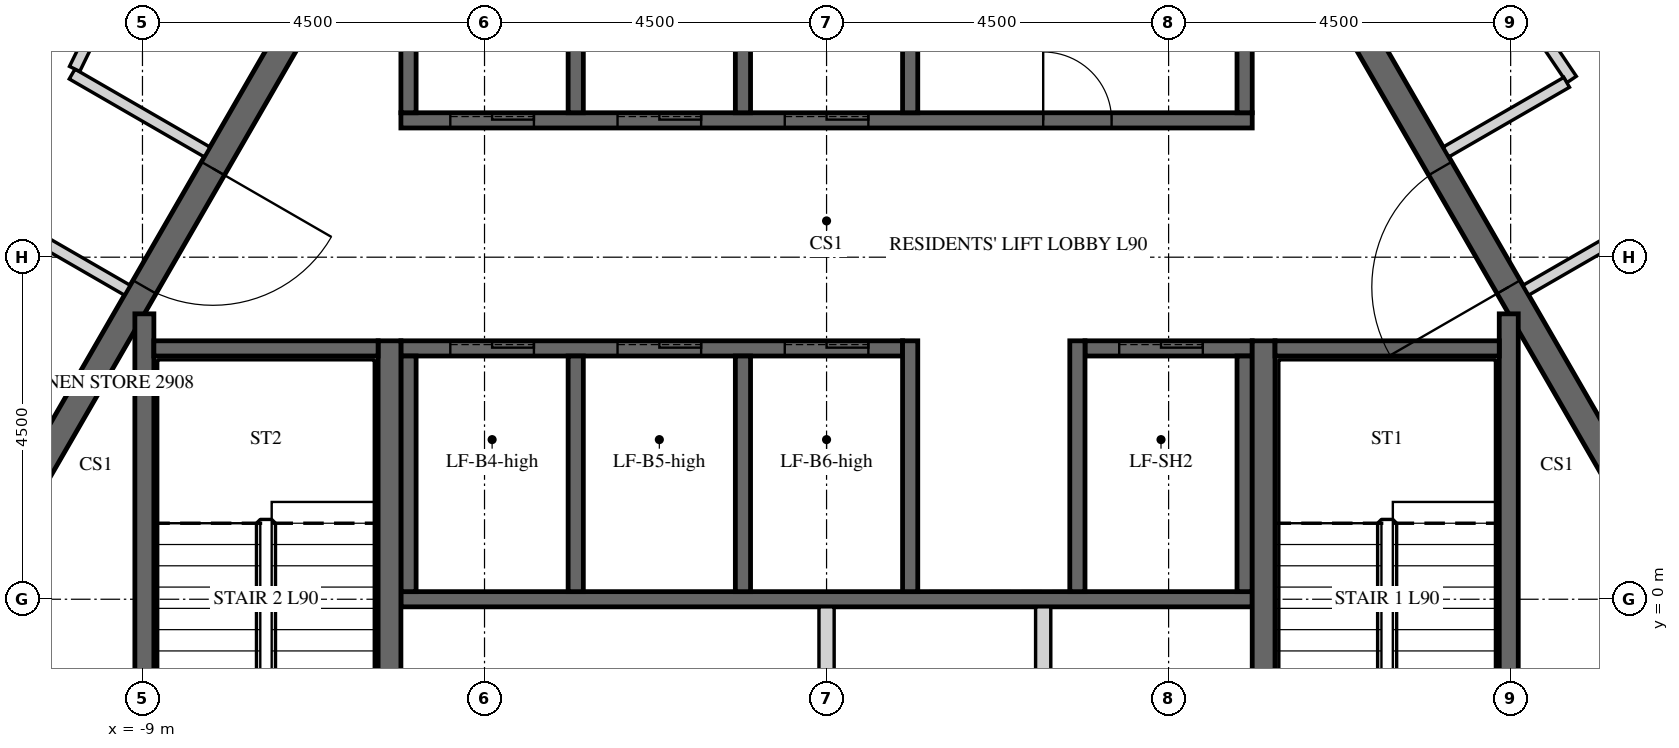
"""IFC4 building model, lengths in metres.
Left out: names, types, materials, properties, quantities, classifications, styles, units other than length and angle.
Written with IfcOpenShell. Run it as: python <this file> out.ifc"""

import sys

from ifc_helpers import new_model, si_unit, direction, frame, frame_2d, origin, place, context, subcontext, project, spatial, polyline, rectangle, outline, extrude, element, fill, save


model = new_model("IFC4")
c1 = context("Model", 3, precision=1e-05, world=origin(), true_north=direction((0.0, 1.0)))
c2 = subcontext(c1, "Body", "Model", "MODEL_VIEW")
j1 = project(units=[si_unit("LENGTHUNIT", "METRE"), si_unit("PLANEANGLEUNIT", "RADIAN")], contexts=[c1])
p1 = place(None, origin())
s1 = spatial("IfcSite", under=j1, at=p1, CompositionType="ELEMENT")
p2 = place(p1, origin())
s2 = spatial("IfcBuilding", under=s1, at=p2, CompositionType="ELEMENT")
p3 = place(p2, frame((0.0, 0.0, 372.9)))
s3 = spatial("IfcBuildingStorey", under=s2, at=p3, CompositionType="ELEMENT", Elevation=372.9)
p4 = place(p3, frame((-5.673, 9.825, -0.15), z_axis=(0.0, 0.0, 1.0), x_axis=(-0.499995046907, -0.866028263435, 0.0)))
e1 = element("IfcWall", 1, at=p4, inside=s3, PredefinedType="SHEAR", context=c2, shape_type="SweptSolid", body=[
    extrude(outline(polyline([(-0.101, -0.175), (11.446, -0.175), (11.244, 0.175), (0.101, 0.175), (-0.101, -0.175)])), origin(), (0.0, 0.0, 1.0), 3.55),
])
p5 = place(p4, frame((4.801, 0.0, 0.15)))
e2 = element("IfcOpeningElement", 2, at=p5, cuts=e1, PredefinedType="OPENING", context=c2, shape_type="SweptSolid", body=[
    extrude(rectangle(XDim=1.8, YDim=2.4, at=frame_2d((0.9, 1.2))), frame((0.0, 0.185, 0.0), z_axis=(0.0, -1.0, 0.0), x_axis=(1.0, 0.0, 0.0)), (0.0, 0.0, 1.0), 0.37),
])
p6 = place(p3, frame((-11.345, 0.0, -0.15), z_axis=(0.0, 0.0, 1.0), x_axis=(0.499995046907, -0.866028263435, 0.0)))
e3 = element("IfcWall", 3, at=p6, inside=s3, PredefinedType="SHEAR", context=c2, shape_type="SweptSolid", body=[
    extrude(outline(polyline([(-0.101, -0.175), (11.446, -0.175), (11.244, 0.175), (0.101, 0.175), (-0.101, -0.175)])), origin(), (0.0, 0.0, 1.0), 3.55),
])
p7 = place(p6, frame((4.744, 0.0, 0.15)))
e4 = element("IfcOpeningElement", 4, at=p7, cuts=e3, PredefinedType="OPENING", context=c2, shape_type="SweptSolid", body=[
    extrude(rectangle(XDim=1.8, YDim=2.4, at=frame_2d((0.9, 1.2))), frame((0.0, 0.185, 0.0), z_axis=(0.0, -1.0, 0.0), x_axis=(1.0, 0.0, 0.0)), (0.0, 0.0, 1.0), 0.37),
])
p8 = place(p3, frame((5.673, -9.825, -0.15), z_axis=(0.0, 0.0, 1.0), x_axis=(0.499995046907, 0.866028263435, 0.0)))
e5 = element("IfcWall", 5, at=p8, inside=s3, PredefinedType="SHEAR", context=c2, shape_type="SweptSolid", body=[
    extrude(outline(polyline([(-0.101, -0.175), (11.446, -0.175), (11.244, 0.175), (0.101, 0.175), (-0.101, -0.175)])), origin(), (0.0, 0.0, 1.0), 3.55),
])
p9 = place(p8, frame((4.801, 0.0, 0.15)))
e6 = element("IfcOpeningElement", 6, at=p9, cuts=e5, PredefinedType="OPENING", context=c2, shape_type="SweptSolid", body=[
    extrude(rectangle(XDim=1.8, YDim=2.4, at=frame_2d((0.9, 1.2))), frame((0.0, 0.185, 0.0), z_axis=(0.0, -1.0, 0.0), x_axis=(1.0, 0.0, 0.0)), (0.0, 0.0, 1.0), 0.37),
])
p10 = place(p3, frame((11.345, 0.0, -0.15), z_axis=(0.0, 0.0, 1.0), x_axis=(-0.499995046907, 0.866028263435, 0.0)))
e7 = element("IfcWall", 7, at=p10, inside=s3, PredefinedType="SHEAR", context=c2, shape_type="SweptSolid", body=[
    extrude(outline(polyline([(-0.101, -0.175), (11.446, -0.175), (11.244, 0.175), (0.101, 0.175), (-0.101, -0.175)])), origin(), (0.0, 0.0, 1.0), 3.55),
])
p11 = place(p10, frame((4.744, 0.0, 0.15)))
e8 = element("IfcOpeningElement", 8, at=p11, cuts=e7, PredefinedType="OPENING", context=c2, shape_type="SweptSolid", body=[
    extrude(rectangle(XDim=1.8, YDim=2.4, at=frame_2d((0.9, 1.2))), frame((0.0, 0.185, 0.0), z_axis=(0.0, -1.0, 0.0), x_axis=(1.0, 0.0, 0.0)), (0.0, 0.0, 1.0), 0.37),
])
p12 = place(p3, frame((-5.6, 6.3, -0.25), z_axis=(0.0, 0.0, 1.0), x_axis=(1.0, 0.0, 0.0)))
e9 = element("IfcWall", 9, at=p12, inside=s3, PredefinedType="SHEAR", context=c2, shape_type="SweptSolid", body=[
    extrude(rectangle(XDim=11.2, YDim=0.2, at=frame_2d((5.6, 0.0))), origin(), (0.0, 0.0, 1.0), 3.9),
])
p13 = place(p12, frame((8.45, 0.0, 0.25)))
e10 = element("IfcOpeningElement", 10, at=p13, cuts=e9, PredefinedType="OPENING", context=c2, shape_type="SweptSolid", body=[
    extrude(rectangle(XDim=0.9, YDim=2.1, at=frame_2d((0.45, 1.05))), frame((0.0, 0.11, 0.0), z_axis=(0.0, -1.0, 0.0), x_axis=(1.0, 0.0, 0.0)), (0.0, 0.0, 1.0), 0.22),
])
p14 = place(p12, frame((0.65, 0.0, 0.25)))
e11 = element("IfcOpeningElement", 11, at=p14, cuts=e9, PredefinedType="OPENING", context=c2, shape_type="SweptSolid", body=[
    extrude(rectangle(XDim=1.1, YDim=2.1, at=frame_2d((0.55, 1.05))), frame((0.0, 0.11, 0.0), z_axis=(0.0, -1.0, 0.0), x_axis=(1.0, 0.0, 0.0)), (0.0, 0.0, 1.0), 0.22),
])
p15 = place(p12, frame((2.85, 0.0, 0.25)))
e12 = element("IfcOpeningElement", 12, at=p15, cuts=e9, PredefinedType="OPENING", context=c2, shape_type="SweptSolid", body=[
    extrude(rectangle(XDim=1.1, YDim=2.1, at=frame_2d((0.55, 1.05))), frame((0.0, 0.11, 0.0), z_axis=(0.0, -1.0, 0.0), x_axis=(1.0, 0.0, 0.0)), (0.0, 0.0, 1.0), 0.22),
])
p16 = place(p12, frame((5.05, 0.0, 0.25)))
e13 = element("IfcOpeningElement", 13, at=p16, cuts=e9, PredefinedType="OPENING", context=c2, shape_type="SweptSolid", body=[
    extrude(rectangle(XDim=1.1, YDim=2.1, at=frame_2d((0.55, 1.05))), frame((0.0, 0.11, 0.0), z_axis=(0.0, -1.0, 0.0), x_axis=(1.0, 0.0, 0.0)), (0.0, 0.0, 1.0), 0.22),
])
for number, where, z_axis, x_axis in (
    (14, (-5.5, 6.4, -0.25), (0.0, 0.0, 1.0), (0.0, 1.0, 0.0)),
    (15, (-3.3, 6.4, -0.25), (0.0, 0.0, 1.0), (0.0, 1.0, 0.0)),
    (16, (-1.1, 6.4, -0.25), (0.0, 0.0, 1.0), (0.0, 1.0, 0.0)),
    (17, (1.1, 6.4, -0.25), (0.0, 0.0, 1.0), (0.0, 1.0, 0.0)),
    (18, (5.5, 6.4, -0.25), (0.0, 0.0, 1.0), (0.0, 1.0, 0.0)),
):
    element("IfcWall", number, at=place(p3, frame(where, z_axis=z_axis, x_axis=x_axis)), inside=s3, PredefinedType="SHEAR", context=c2, shape_type="SweptSolid", body=[
        extrude(rectangle(XDim=2.9, YDim=0.2, at=frame_2d((1.45, 0.0))), origin(), (0.0, 0.0, 1.0), 3.9),
    ])
p17 = place(p3, frame((-5.6, 3.3, -0.25), z_axis=(0.0, 0.0, 1.0), x_axis=(1.0, 0.0, 0.0)))
e19 = element("IfcWall", 19, at=p17, inside=s3, PredefinedType="SHEAR", context=c2, shape_type="SweptSolid", body=[
    extrude(rectangle(XDim=6.6, YDim=0.2, at=frame_2d((3.3, 0.0))), origin(), (0.0, 0.0, 1.0), 3.9),
])
p18 = place(p17, frame((0.65, 0.0, 0.25)))
e20 = element("IfcOpeningElement", 20, at=p18, cuts=e19, PredefinedType="OPENING", context=c2, shape_type="SweptSolid", body=[
    extrude(rectangle(XDim=1.1, YDim=2.1, at=frame_2d((0.55, 1.05))), frame((0.0, 0.11, 0.0), z_axis=(0.0, -1.0, 0.0), x_axis=(1.0, 0.0, 0.0)), (0.0, 0.0, 1.0), 0.22),
])
p19 = place(p17, frame((2.85, 0.0, 0.25)))
e21 = element("IfcOpeningElement", 21, at=p19, cuts=e19, PredefinedType="OPENING", context=c2, shape_type="SweptSolid", body=[
    extrude(rectangle(XDim=1.1, YDim=2.1, at=frame_2d((0.55, 1.05))), frame((0.0, 0.11, 0.0), z_axis=(0.0, -1.0, 0.0), x_axis=(1.0, 0.0, 0.0)), (0.0, 0.0, 1.0), 0.22),
])
p20 = place(p17, frame((5.05, 0.0, 0.25)))
e22 = element("IfcOpeningElement", 22, at=p20, cuts=e19, PredefinedType="OPENING", context=c2, shape_type="SweptSolid", body=[
    extrude(rectangle(XDim=1.1, YDim=2.1, at=frame_2d((0.55, 1.05))), frame((0.0, 0.11, 0.0), z_axis=(0.0, -1.0, 0.0), x_axis=(1.0, 0.0, 0.0)), (0.0, 0.0, 1.0), 0.22),
])
p21 = place(p3, frame((3.4, 3.3, -0.25), z_axis=(0.0, 0.0, 1.0), x_axis=(1.0, 0.0, 0.0)))
e23 = element("IfcWall", 23, at=p21, inside=s3, PredefinedType="SHEAR", context=c2, shape_type="SweptSolid", body=[
    extrude(rectangle(XDim=2.2, YDim=0.2, at=frame_2d((1.1, 0.0))), origin(), (0.0, 0.0, 1.0), 3.9),
])
p22 = place(p21, frame((0.45, 0.0, 0.25)))
e24 = element("IfcOpeningElement", 24, at=p22, cuts=e23, PredefinedType="OPENING", context=c2, shape_type="SweptSolid", body=[
    extrude(rectangle(XDim=1.1, YDim=2.1, at=frame_2d((0.55, 1.05))), frame((0.0, 0.11, 0.0), z_axis=(0.0, -1.0, 0.0), x_axis=(1.0, 0.0, 0.0)), (0.0, 0.0, 1.0), 0.22),
])
p23 = place(p3, frame((-5.6, 0.0, -0.25), z_axis=(0.0, 0.0, 1.0), x_axis=(1.0, 0.0, 0.0)))
e25 = element("IfcWall", 25, at=p23, inside=s3, PredefinedType="SHEAR", context=c2, shape_type="SweptSolid", body=[
    extrude(rectangle(XDim=11.2, YDim=0.2, at=frame_2d((5.6, 0.0))), origin(), (0.0, 0.0, 1.0), 3.9),
])
for number, where, z_axis, x_axis in (
    (26, (-5.5, 0.1, -0.25), (0.0, 0.0, 1.0), (0.0, 1.0, 0.0)),
    (27, (-3.3, 0.1, -0.25), (0.0, 0.0, 1.0), (0.0, 1.0, 0.0)),
    (28, (-1.1, 0.1, -0.25), (0.0, 0.0, 1.0), (0.0, 1.0, 0.0)),
):
    element("IfcWall", number, at=place(p3, frame(where, z_axis=z_axis, x_axis=x_axis)), inside=s3, PredefinedType="SHEAR", context=c2, shape_type="SweptSolid", body=[
        extrude(rectangle(XDim=3.1, YDim=0.2, at=frame_2d((1.55, 0.0))), origin(), (0.0, 0.0, 1.0), 3.9),
    ])
for number, where, z_axis, x_axis in (
    (29, (1.1, 0.1, -0.25), (0.0, 0.0, 1.0), (0.0, 1.0, 0.0)),
    (30, (3.3, 0.1, -0.25), (0.0, 0.0, 1.0), (0.0, 1.0, 0.0)),
):
    element("IfcWall", number, at=place(p3, frame(where, z_axis=z_axis, x_axis=x_axis)), inside=s3, PredefinedType="SHEAR", context=c2, shape_type="SweptSolid", body=[
        extrude(rectangle(XDim=3.3, YDim=0.2, at=frame_2d((1.65, 0.0))), origin(), (0.0, 0.0, 1.0), 3.9),
    ])
p24 = place(p3, frame((5.5, 0.1, -0.25), z_axis=(0.0, 0.0, 1.0), x_axis=(0.0, 1.0, 0.0)))
e31 = element("IfcWall", 31, at=p24, inside=s3, PredefinedType="SHEAR", context=c2, shape_type="SweptSolid", body=[
    extrude(rectangle(XDim=3.1, YDim=0.2, at=frame_2d((1.55, 0.0))), origin(), (0.0, 0.0, 1.0), 3.9),
])
p25 = place(p3, frame((2.85, -3.2, 0.0), z_axis=(0.0, 0.0, 1.0), x_axis=(0.0, 1.0, 0.0)))
e32 = element("IfcWall", 32, at=p25, inside=s3, PredefinedType="PARTITIONING", context=c2, shape_type="SweptSolid", body=[
    extrude(rectangle(XDim=3.1, YDim=0.2, at=frame_2d((1.55, 0.0))), origin(), (0.0, 0.0, 1.0), 3.65),
])
p26 = place(p3, frame((0.0, -6.2, 0.0), z_axis=(0.0, 0.0, 1.0), x_axis=(0.0, 1.0, 0.0)))
e33 = element("IfcWall", 33, at=p26, inside=s3, PredefinedType="PARTITIONING", context=c2, shape_type="SweptSolid", body=[
    extrude(rectangle(XDim=6.1, YDim=0.2, at=frame_2d((3.05, 0.0))), origin(), (0.0, 0.0, 1.0), 3.65),
])
p27 = place(p3, frame((5.75, -3.4, -0.25), z_axis=(0.0, 0.0, 1.0), x_axis=(0.0, 1.0, 0.0)))
e34 = element("IfcWall", 34, at=p27, inside=s3, PredefinedType="SHEAR", context=c2, shape_type="SweptSolid", body=[
    extrude(rectangle(XDim=6.8, YDim=0.3, at=frame_2d((3.4, 0.0))), origin(), (0.0, 0.0, 1.0), 3.9),
])
p28 = place(p3, frame((8.975, -3.755, -0.25), z_axis=(0.0, 0.0, 1.0), x_axis=(0.0, 1.0, 0.0)))
e35 = element("IfcWall", 35, at=p28, inside=s3, PredefinedType="SHEAR", context=c2, shape_type="SweptSolid", body=[
    extrude(rectangle(XDim=7.51, YDim=0.25, at=frame_2d((3.755, 0.0))), origin(), (0.0, 0.0, 1.0), 3.9),
])
p29 = place(p3, frame((5.9, 3.3, -0.25), z_axis=(0.0, 0.0, 1.0), x_axis=(1.0, 0.0, 0.0)))
e36 = element("IfcWall", 36, at=p29, inside=s3, PredefinedType="SHEAR", context=c2, shape_type="SweptSolid", body=[
    extrude(rectangle(XDim=2.95, YDim=0.2, at=frame_2d((1.475, 0.0))), origin(), (0.0, 0.0, 1.0), 3.9),
])
p30 = place(p3, frame((-5.75, -3.4, -0.25), z_axis=(0.0, 0.0, 1.0), x_axis=(0.0, 1.0, 0.0)))
e37 = element("IfcWall", 37, at=p30, inside=s3, PredefinedType="SHEAR", context=c2, shape_type="SweptSolid", body=[
    extrude(rectangle(XDim=6.8, YDim=0.3, at=frame_2d((3.4, 0.0))), origin(), (0.0, 0.0, 1.0), 3.9),
])
p31 = place(p3, frame((-8.975, -3.755, -0.25), z_axis=(0.0, 0.0, 1.0), x_axis=(0.0, 1.0, 0.0)))
e38 = element("IfcWall", 38, at=p31, inside=s3, PredefinedType="SHEAR", context=c2, shape_type="SweptSolid", body=[
    extrude(rectangle(XDim=7.51, YDim=0.25, at=frame_2d((3.755, 0.0))), origin(), (0.0, 0.0, 1.0), 3.9),
])
p32 = place(p3, frame((-8.85, 3.3, -0.25), z_axis=(0.0, 0.0, 1.0), x_axis=(1.0, 0.0, 0.0)))
e39 = element("IfcWall", 39, at=p32, inside=s3, PredefinedType="SHEAR", context=c2, shape_type="SweptSolid", body=[
    extrude(rectangle(XDim=2.95, YDim=0.2, at=frame_2d((1.475, 0.0))), origin(), (0.0, 0.0, 1.0), 3.9),
])
p33 = place(p3, frame((-7.653, 15.675, 0.0), z_axis=(0.0, 0.0, 1.0), x_axis=(-0.438369669055, -0.898794767037, 0.0)))
e40 = element("IfcWall", 40, at=p33, inside=s3, PredefinedType="PARTITIONING", context=c2, shape_type="SweptSolid", body=[
    extrude(rectangle(XDim=15.243, YDim=0.15, at=frame_2d((7.621, 0.0))), origin(), (0.0, 0.0, 1.0), 2.47),
])
p34 = place(p33, frame((2.942, 0.0, 0.0)))
e41 = element("IfcOpeningElement", 41, at=p34, cuts=e40, PredefinedType="OPENING", context=c2, shape_type="SweptSolid", body=[
    extrude(rectangle(XDim=1.0, YDim=2.1, at=frame_2d((0.5, 1.05))), frame((0.0, 0.085, 0.0), z_axis=(0.0, -1.0, 0.0), x_axis=(1.0, 0.0, 0.0)), (0.0, 0.0, 1.0), 0.17),
])
p35 = place(p3, frame((-8.15, 5.884, 0.0), z_axis=(0.0, 0.0, 1.0), x_axis=(-0.866007146345, 0.50003162148, 0.0)))
e42 = element("IfcWall", 42, at=p35, inside=s3, PredefinedType="PARTITIONING", context=c2, shape_type="SweptSolid", body=[
    extrude(rectangle(XDim=2.051, YDim=0.15, at=frame_2d((1.025, 0.0))), origin(), (0.0, 0.0, 1.0), 2.47),
])
p36 = place(p3, frame((-9.893, 6.977, 0.0), z_axis=(0.0, 0.0, 1.0), x_axis=(0.438380229518, 0.898789616299, 0.0)))
e43 = element("IfcWall", 43, at=p36, inside=s3, PredefinedType="PARTITIONING", context=c2, shape_type="SweptSolid", body=[
    extrude(rectangle(XDim=7.758, YDim=0.15, at=frame_2d((3.879, 0.0))), origin(), (0.0, 0.0, 1.0), 2.47),
])
p37 = place(p3, frame((-10.783, 4.98, 0.0), z_axis=(0.0, 0.0, 1.0), x_axis=(0.866007702746, -0.500030657845, 0.0)))
e44 = element("IfcWall", 44, at=p37, inside=s3, PredefinedType="PARTITIONING", context=c2, shape_type="SweptSolid", body=[
    extrude(rectangle(XDim=1.829, YDim=0.15, at=frame_2d((0.914, 0.0))), origin(), (0.0, 0.0, 1.0), 2.47),
])
p38 = place(p3, frame((17.401, -1.21, 0.0), z_axis=(0.0, 0.0, 1.0), x_axis=(-0.559186729505, 0.829041736914, 0.0)))
e45 = element("IfcWall", 45, at=p38, inside=s3, PredefinedType="PARTITIONING", context=c2, shape_type="SweptSolid", body=[
    extrude(rectangle(XDim=15.243, YDim=0.15, at=frame_2d((7.621, 0.0))), origin(), (0.0, 0.0, 1.0), 2.47),
])
p39 = place(p38, frame((5.802, 0.0, 0.0)))
e46 = element("IfcOpeningElement", 46, at=p39, cuts=e45, PredefinedType="OPENING", context=c2, shape_type="SweptSolid", body=[
    extrude(rectangle(XDim=1.0, YDim=2.1, at=frame_2d((0.5, 1.05))), frame((0.0, 0.085, 0.0), z_axis=(0.0, -1.0, 0.0), x_axis=(1.0, 0.0, 0.0)), (0.0, 0.0, 1.0), 0.17),
])
p40 = place(p3, frame((9.2, 4.066, 0.0), z_axis=(0.0, 0.0, 1.0), x_axis=(0.866011447264, 0.500024172624, 0.0)))
e47 = element("IfcWall", 47, at=p40, inside=s3, PredefinedType="PARTITIONING", context=c2, shape_type="SweptSolid", body=[
    extrude(rectangle(XDim=2.055, YDim=0.15, at=frame_2d((1.027, 0.0))), origin(), (0.0, 0.0, 1.0), 2.47),
])
p41 = place(p3, frame((6.999, 10.994, 0.0), z_axis=(0.0, 0.0, 1.0), x_axis=(0.55918759866, -0.82904115067, 0.0)))
e48 = element("IfcWall", 48, at=p41, inside=s3, PredefinedType="PARTITIONING", context=c2, shape_type="SweptSolid", body=[
    extrude(rectangle(XDim=5.013, YDim=0.15, at=frame_2d((2.506, 0.0))), origin(), (0.0, 0.0, 1.0), 2.47),
])
p42 = place(p41, frame((2.057, 0.0, 0.0)))
e49 = element("IfcOpeningElement", 49, at=p42, cuts=e48, PredefinedType="OPENING", context=c2, shape_type="SweptSolid", body=[
    extrude(rectangle(XDim=0.9, YDim=2.1, at=frame_2d((0.45, 1.05))), frame((0.0, 0.085, 0.0), z_axis=(0.0, -1.0, 0.0), x_axis=(1.0, 0.0, 0.0)), (0.0, 0.0, 1.0), 0.17),
])
p43 = place(p3, frame((9.737, 6.801, 0.0), z_axis=(0.0, 0.0, 1.0), x_axis=(-0.866045829247, -0.499964620392, 0.0)))
e50 = element("IfcWall", 50, at=p43, inside=s3, PredefinedType="PARTITIONING", context=c2, shape_type="SweptSolid", body=[
    extrude(rectangle(XDim=1.833, YDim=0.15, at=frame_2d((0.917, 0.0))), origin(), (0.0, 0.0, 1.0), 2.47),
])
p44 = place(p5, origin())
e51 = element("IfcDoor", 51, at=p44, inside=s3, OperationType="DOUBLE_DOOR_SINGLE_SWING", PredefinedType="DOOR", context=c2, shape_type="SweptSolid", body=[
    extrude(rectangle(XDim=1.8, YDim=2.4, at=frame_2d((0.9, 1.2))), frame((0.0, 0.025, 0.0), z_axis=(0.0, -1.0, 0.0), x_axis=(1.0, 0.0, 0.0)), (0.0, 0.0, 1.0), 0.05),
])
fill(e2, e51)
p45 = place(p11, origin())
e52 = element("IfcDoor", 52, at=p45, inside=s3, OperationType="DOUBLE_DOOR_SINGLE_SWING", PredefinedType="DOOR", context=c2, shape_type="SweptSolid", body=[
    extrude(rectangle(XDim=1.8, YDim=2.4, at=frame_2d((0.9, 1.2))), frame((0.0, 0.025, 0.0), z_axis=(0.0, -1.0, 0.0), x_axis=(1.0, 0.0, 0.0)), (0.0, 0.0, 1.0), 0.05),
])
fill(e8, e52)
p46 = place(p13, origin())
e53 = element("IfcDoor", 53, at=p46, inside=s3, OperationType="SINGLE_SWING_LEFT", PredefinedType="DOOR", context=c2, shape_type="SweptSolid", body=[
    extrude(rectangle(XDim=0.9, YDim=2.1, at=frame_2d((0.45, 1.05))), frame((0.0, 0.025, 0.0), z_axis=(0.0, -1.0, 0.0), x_axis=(1.0, 0.0, 0.0)), (0.0, 0.0, 1.0), 0.05),
])
fill(e10, e53)
p47 = place(p14, origin())
e54 = element("IfcDoor", 54, at=p47, inside=s3, OperationType="SLIDING_TO_LEFT", PredefinedType="DOOR", context=c2, shape_type="SweptSolid", body=[
    extrude(rectangle(XDim=1.1, YDim=2.1, at=frame_2d((0.55, 1.05))), frame((0.0, 0.025, 0.0), z_axis=(0.0, -1.0, 0.0), x_axis=(1.0, 0.0, 0.0)), (0.0, 0.0, 1.0), 0.05),
])
fill(e11, e54)
p48 = place(p15, origin())
e55 = element("IfcDoor", 55, at=p48, inside=s3, OperationType="SLIDING_TO_LEFT", PredefinedType="DOOR", context=c2, shape_type="SweptSolid", body=[
    extrude(rectangle(XDim=1.1, YDim=2.1, at=frame_2d((0.55, 1.05))), frame((0.0, 0.025, 0.0), z_axis=(0.0, -1.0, 0.0), x_axis=(1.0, 0.0, 0.0)), (0.0, 0.0, 1.0), 0.05),
])
fill(e12, e55)
p49 = place(p16, origin())
e56 = element("IfcDoor", 56, at=p49, inside=s3, OperationType="SLIDING_TO_LEFT", PredefinedType="DOOR", context=c2, shape_type="SweptSolid", body=[
    extrude(rectangle(XDim=1.1, YDim=2.1, at=frame_2d((0.55, 1.05))), frame((0.0, 0.025, 0.0), z_axis=(0.0, -1.0, 0.0), x_axis=(1.0, 0.0, 0.0)), (0.0, 0.0, 1.0), 0.05),
])
fill(e13, e56)
p50 = place(p18, origin())
e57 = element("IfcDoor", 57, at=p50, inside=s3, OperationType="SLIDING_TO_LEFT", PredefinedType="DOOR", context=c2, shape_type="SweptSolid", body=[
    extrude(rectangle(XDim=1.1, YDim=2.1, at=frame_2d((0.55, 1.05))), frame((0.0, 0.025, 0.0), z_axis=(0.0, -1.0, 0.0), x_axis=(1.0, 0.0, 0.0)), (0.0, 0.0, 1.0), 0.05),
])
fill(e20, e57)
p51 = place(p19, origin())
e58 = element("IfcDoor", 58, at=p51, inside=s3, OperationType="SLIDING_TO_LEFT", PredefinedType="DOOR", context=c2, shape_type="SweptSolid", body=[
    extrude(rectangle(XDim=1.1, YDim=2.1, at=frame_2d((0.55, 1.05))), frame((0.0, 0.025, 0.0), z_axis=(0.0, -1.0, 0.0), x_axis=(1.0, 0.0, 0.0)), (0.0, 0.0, 1.0), 0.05),
])
fill(e21, e58)
p52 = place(p20, origin())
e59 = element("IfcDoor", 59, at=p52, inside=s3, OperationType="SLIDING_TO_LEFT", PredefinedType="DOOR", context=c2, shape_type="SweptSolid", body=[
    extrude(rectangle(XDim=1.1, YDim=2.1, at=frame_2d((0.55, 1.05))), frame((0.0, 0.025, 0.0), z_axis=(0.0, -1.0, 0.0), x_axis=(1.0, 0.0, 0.0)), (0.0, 0.0, 1.0), 0.05),
])
fill(e22, e59)
p53 = place(p22, origin())
e60 = element("IfcDoor", 60, at=p53, inside=s3, OperationType="SLIDING_TO_LEFT", PredefinedType="DOOR", context=c2, shape_type="SweptSolid", body=[
    extrude(rectangle(XDim=1.1, YDim=2.1, at=frame_2d((0.55, 1.05))), frame((0.0, 0.025, 0.0), z_axis=(0.0, -1.0, 0.0), x_axis=(1.0, 0.0, 0.0)), (0.0, 0.0, 1.0), 0.05),
])
fill(e24, e60)
save(model, sys.argv[1])
